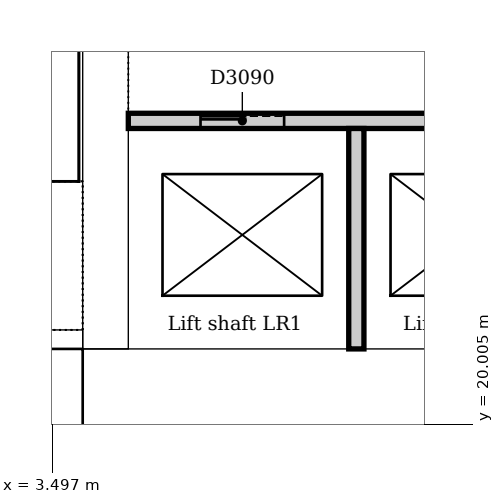
"""IFC4 building model, lengths in metres.
Left out: names, types, materials, properties, quantities, classifications, styles, units other than length and angle.
Written with IfcOpenShell. Run it as: python <this file> out.ifc"""

import sys

from ifc_helpers import new_model, si_unit, direction, frame, frame_2d, origin, place, context, subcontext, project, spatial, rectangle, extrude, element, fill, save


model = new_model("IFC4")
c1 = context("Model", 3, precision=1e-05, world=origin(), true_north=direction((0.0, 1.0)))
c2 = subcontext(c1, "Body", "Model", "MODEL_VIEW")
j1 = project(units=[si_unit("LENGTHUNIT", "METRE"), si_unit("PLANEANGLEUNIT", "RADIAN")], contexts=[c1])
p1 = place(None, origin())
s1 = spatial("IfcSite", under=j1, at=p1, CompositionType="ELEMENT")
p2 = place(p1, origin())
s2 = spatial("IfcBuilding", under=s1, at=p2, CompositionType="ELEMENT")
p3 = place(p2, frame((0.0, 0.0, 6.0)))
s3 = spatial("IfcBuildingStorey", under=s2, at=p3, CompositionType="ELEMENT", Elevation=6.0)
p4 = place(p3, frame((3.9, 20.4, 0.0), z_axis=(0.0, 0.0, 1.0), x_axis=(1.0, 0.0, 0.0)))
e1 = element("IfcWall", 1, at=p4, inside=s3, PredefinedType="SOLIDWALL", context=c2, shape_type="SweptSolid", body=[
    extrude(rectangle(XDim=19.8, YDim=1.2, at=frame_2d((9.9, 0.0))), origin(), (0.0, 0.0, 1.0), 5.0),
])
p5 = place(p3, frame((4.2, 31.5, 0.0), z_axis=(0.0, 0.0, 1.0), x_axis=(0.0, -1.0, 0.0)))
e2 = element("IfcWall", 2, at=p5, inside=s3, PredefinedType="SOLIDWALL", context=c2, shape_type="SweptSolid", body=[
    extrude(rectangle(XDim=10.5, YDim=0.6, at=frame_2d((5.25, 0.0))), origin(), (0.0, 0.0, 1.0), 5.0),
])
p6 = place(p5, frame((4.25, 0.0, 0.0)))
e3 = element("IfcOpeningElement", 3, at=p6, cuts=e2, PredefinedType="OPENING", context=c2, shape_type="SweptSolid", body=[
    extrude(rectangle(XDim=1.0, YDim=2.1, at=frame_2d((0.5, 1.05))), frame((0.0, 0.31, 0.0), z_axis=(0.0, -1.0, 0.0), x_axis=(1.0, 0.0, 0.0)), (0.0, 0.0, 1.0), 0.62),
])
p7 = place(p3, frame((0.36, 21.125, 0.0), z_axis=(0.0, 0.0, 1.0), x_axis=(1.0, 0.0, 0.0)))
e4 = element("IfcWall", 4, at=p7, inside=s3, PredefinedType="SOLIDWALL", context=c2, shape_type="SweptSolid", body=[
    extrude(rectangle(XDim=3.54, YDim=0.25, at=frame_2d((1.77, 0.0))), origin(), (0.0, 0.0, 1.0), 5.0),
])
p8 = place(p3, frame((4.5, 24.0, 0.0), z_axis=(0.0, 0.0, 1.0), x_axis=(1.0, 0.0, 0.0)))
e5 = element("IfcWall", 5, at=p8, inside=s3, PredefinedType="PARTITIONING", context=c2, shape_type="SweptSolid", body=[
    extrude(rectangle(XDim=18.0, YDim=0.2, at=frame_2d((9.0, 0.0))), origin(), (0.0, 0.0, 1.0), 4.7),
])
p9 = place(p8, frame((0.95, 0.0, 0.0)))
e6 = element("IfcOpeningElement", 6, at=p9, cuts=e5, PredefinedType="OPENING", context=c2, shape_type="SweptSolid", body=[
    extrude(rectangle(XDim=1.1, YDim=2.1, at=frame_2d((0.55, 1.05))), frame((0.0, 0.11, 0.0), z_axis=(0.0, -1.0, 0.0), x_axis=(1.0, 0.0, 0.0)), (0.0, 0.0, 1.0), 0.22),
])
p10 = place(p8, frame((3.95, 0.0, 0.0)))
e7 = element("IfcOpeningElement", 7, at=p10, cuts=e5, PredefinedType="OPENING", context=c2, shape_type="SweptSolid", body=[
    extrude(rectangle(XDim=1.1, YDim=2.1, at=frame_2d((0.55, 1.05))), frame((0.0, 0.11, 0.0), z_axis=(0.0, -1.0, 0.0), x_axis=(1.0, 0.0, 0.0)), (0.0, 0.0, 1.0), 0.22),
])
p11 = place(p8, frame((6.95, 0.0, 0.0)))
e8 = element("IfcOpeningElement", 8, at=p11, cuts=e5, PredefinedType="OPENING", context=c2, shape_type="SweptSolid", body=[
    extrude(rectangle(XDim=1.1, YDim=2.1, at=frame_2d((0.55, 1.05))), frame((0.0, 0.11, 0.0), z_axis=(0.0, -1.0, 0.0), x_axis=(1.0, 0.0, 0.0)), (0.0, 0.0, 1.0), 0.22),
])
p12 = place(p8, frame((9.95, 0.0, 0.0)))
e9 = element("IfcOpeningElement", 9, at=p12, cuts=e5, PredefinedType="OPENING", context=c2, shape_type="SweptSolid", body=[
    extrude(rectangle(XDim=1.1, YDim=2.1, at=frame_2d((0.55, 1.05))), frame((0.0, 0.11, 0.0), z_axis=(0.0, -1.0, 0.0), x_axis=(1.0, 0.0, 0.0)), (0.0, 0.0, 1.0), 0.22),
])
p13 = place(p8, frame((12.95, 0.0, 0.0)))
e10 = element("IfcOpeningElement", 10, at=p13, cuts=e5, PredefinedType="OPENING", context=c2, shape_type="SweptSolid", body=[
    extrude(rectangle(XDim=1.1, YDim=2.1, at=frame_2d((0.55, 1.05))), frame((0.0, 0.11, 0.0), z_axis=(0.0, -1.0, 0.0), x_axis=(1.0, 0.0, 0.0)), (0.0, 0.0, 1.0), 0.22),
])
p14 = place(p8, frame((15.95, 0.0, 0.0)))
e11 = element("IfcOpeningElement", 11, at=p14, cuts=e5, PredefinedType="OPENING", context=c2, shape_type="SweptSolid", body=[
    extrude(rectangle(XDim=1.1, YDim=2.1, at=frame_2d((0.55, 1.05))), frame((0.0, 0.11, 0.0), z_axis=(0.0, -1.0, 0.0), x_axis=(1.0, 0.0, 0.0)), (0.0, 0.0, 1.0), 0.22),
])
p15 = place(p3, frame((7.5, 21.0, 0.0), z_axis=(0.0, 0.0, 1.0), x_axis=(0.0, 1.0, 0.0)))
e12 = element("IfcWall", 12, at=p15, inside=s3, PredefinedType="PARTITIONING", context=c2, shape_type="SweptSolid", body=[
    extrude(rectangle(XDim=2.9, YDim=0.2, at=frame_2d((1.45, 0.0))), origin(), (0.0, 0.0, 1.0), 4.7),
])
p16 = place(p9, origin())
e13 = element("IfcDoor", 13, at=p16, inside=s3, OperationType="SLIDING_TO_LEFT", PredefinedType="DOOR", context=c2, shape_type="SweptSolid", body=[
    extrude(rectangle(XDim=1.1, YDim=2.1, at=frame_2d((0.55, 1.05))), frame((0.0, 0.025, 0.0), z_axis=(0.0, -1.0, 0.0), x_axis=(1.0, 0.0, 0.0)), (0.0, 0.0, 1.0), 0.05),
])
fill(e6, e13)
save(model, sys.argv[1])
